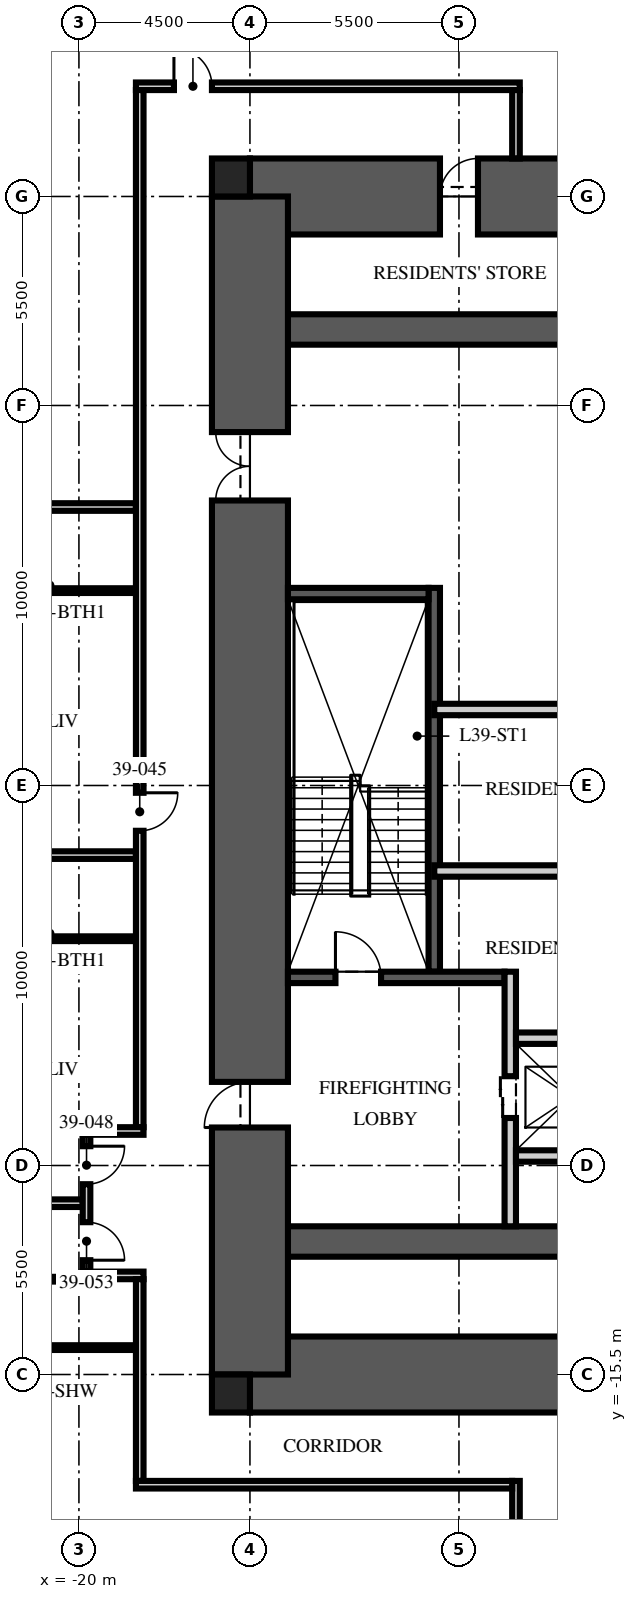
"""IFC4 building model, lengths in metres.
Left out: names, types, materials, properties, quantities, classifications, styles, units other than length and angle.
Written with IfcOpenShell. Run it as: python <this file> out.ifc"""

import sys

from ifc_helpers import new_model, si_unit, direction, frame, frame_2d, origin, origin_2d, place, context, subcontext, project, spatial, rectangle, extrude, element, fill, save


model = new_model("IFC4")
c1 = context("Model", 3, precision=1e-05, world=origin(), true_north=direction((0.0, 1.0)))
c2 = subcontext(c1, "Body", "Model", "MODEL_VIEW")
j1 = project(units=[si_unit("LENGTHUNIT", "METRE"), si_unit("PLANEANGLEUNIT", "RADIAN")], contexts=[c1])
p1 = place(None, origin())
s1 = spatial("IfcSite", under=j1, at=p1, CompositionType="ELEMENT")
p2 = place(p1, origin())
s2 = spatial("IfcBuilding", under=s1, at=p2, CompositionType="ELEMENT")
p3 = place(p2, frame((0.0, 0.0, 156.0)))
s3 = spatial("IfcBuildingStorey", under=s2, at=p3, CompositionType="ELEMENT", Elevation=156.0)
p4 = place(p3, frame((-15.5, 15.5, -0.25), z_axis=(0.0, 0.0, 1.0), x_axis=(1.0, 0.0, 0.0)))
e1 = element("IfcWall", 1, at=p4, inside=s3, PredefinedType="SHEAR", context=c2, shape_type="SweptSolid", body=[
    extrude(rectangle(XDim=31.0, YDim=2.0, at=frame_2d((15.5, 0.0))), origin(), (0.0, 0.0, 1.0), 3.75),
])
p5 = place(p4, frame((5.0, 0.0, 0.25)))
e2 = element("IfcOpeningElement", 2, at=p5, cuts=e1, PredefinedType="OPENING", context=c2, shape_type="SweptSolid", body=[
    extrude(rectangle(XDim=1.0, YDim=2.1, at=frame_2d((0.5, 1.05))), frame((0.0, 1.01, 0.0), z_axis=(0.0, -1.0, 0.0), x_axis=(1.0, 0.0, 0.0)), (0.0, 0.0, 1.0), 2.02),
])
p6 = place(p3, frame((-15.5, -15.5, -0.25), z_axis=(0.0, 0.0, 1.0), x_axis=(1.0, 0.0, 0.0)))
e3 = element("IfcWall", 3, at=p6, inside=s3, PredefinedType="SHEAR", context=c2, shape_type="SweptSolid", body=[
    extrude(rectangle(XDim=31.0, YDim=2.0, at=frame_2d((15.5, 0.0))), origin(), (0.0, 0.0, 1.0), 3.75),
])
p7 = place(p6, frame((10.4, 0.0, 0.25)))
e4 = element("IfcOpeningElement", 4, at=p7, cuts=e3, PredefinedType="OPENING", context=c2, shape_type="SweptSolid", body=[
    extrude(rectangle(XDim=1.1, YDim=2.1, at=frame_2d((0.55, 1.05))), frame((0.0, 1.01, 0.0), z_axis=(0.0, -1.0, 0.0), x_axis=(1.0, 0.0, 0.0)), (0.0, 0.0, 1.0), 2.02),
])
p8 = place(p6, frame((13.5, 0.0, 0.25)))
e5 = element("IfcOpeningElement", 5, at=p8, cuts=e3, PredefinedType="OPENING", context=c2, shape_type="SweptSolid", body=[
    extrude(rectangle(XDim=1.1, YDim=2.1, at=frame_2d((0.55, 1.05))), frame((0.0, 1.01, 0.0), z_axis=(0.0, -1.0, 0.0), x_axis=(1.0, 0.0, 0.0)), (0.0, 0.0, 1.0), 2.02),
])
p9 = place(p6, frame((16.6, 0.0, 0.25)))
e6 = element("IfcOpeningElement", 6, at=p9, cuts=e3, PredefinedType="OPENING", context=c2, shape_type="SweptSolid", body=[
    extrude(rectangle(XDim=1.1, YDim=2.1, at=frame_2d((0.55, 1.05))), frame((0.0, 1.01, 0.0), z_axis=(0.0, -1.0, 0.0), x_axis=(1.0, 0.0, 0.0)), (0.0, 0.0, 1.0), 2.02),
])
for number, where, z_axis, x_axis in (
    (7, (-15.5, 12.0, -0.25), (0.0, 0.0, 1.0), (1.0, 0.0, 0.0)),
    (8, (-15.5, -12.0, -0.25), (0.0, 0.0, 1.0), (1.0, 0.0, 0.0)),
):
    element("IfcWall", number, at=place(p3, frame(where, z_axis=z_axis, x_axis=x_axis)), inside=s3, PredefinedType="SHEAR", context=c2, shape_type="SweptSolid", body=[
        extrude(rectangle(XDim=31.0, YDim=0.8, at=frame_2d((15.5, 0.0))), origin(), (0.0, 0.0, 1.0), 3.75),
    ])
p10 = place(p3, frame((-15.5, -15.5, -0.25), z_axis=(0.0, 0.0, 1.0), x_axis=(0.0, 1.0, 0.0)))
e9 = element("IfcWall", 9, at=p10, inside=s3, PredefinedType="SHEAR", context=c2, shape_type="SweptSolid", body=[
    extrude(rectangle(XDim=31.0, YDim=2.0, at=frame_2d((15.5, 0.0))), origin(), (0.0, 0.0, 1.0), 3.75),
])
p11 = place(p10, frame((6.5, 0.0, 0.25)))
e10 = element("IfcOpeningElement", 10, at=p11, cuts=e9, PredefinedType="OPENING", context=c2, shape_type="SweptSolid", body=[
    extrude(rectangle(XDim=1.2, YDim=2.1, at=frame_2d((0.6, 1.05))), frame((0.0, 1.01, 0.0), z_axis=(0.0, -1.0, 0.0), x_axis=(1.0, 0.0, 0.0)), (0.0, 0.0, 1.0), 2.02),
])
p12 = place(p10, frame((23.0, 0.0, 0.25)))
e11 = element("IfcOpeningElement", 11, at=p12, cuts=e9, PredefinedType="OPENING", context=c2, shape_type="SweptSolid", body=[
    extrude(rectangle(XDim=1.8, YDim=2.1, at=frame_2d((0.9, 1.05))), frame((0.0, 1.01, 0.0), z_axis=(0.0, -1.0, 0.0), x_axis=(1.0, 0.0, 0.0)), (0.0, 0.0, 1.0), 2.02),
])
for number, where, z_axis, x_axis in (
    (12, (-16.0, 16.0, -0.25), (0.0, 0.0, 1.0), (1.0, 0.0, 0.0)),
    (13, (-16.0, -16.0, -0.25), (0.0, 0.0, 1.0), (1.0, 0.0, 0.0)),
):
    element("IfcColumn", number, at=place(p3, frame(where, z_axis=z_axis, x_axis=x_axis)), inside=s3, PredefinedType="COLUMN", context=c2, shape_type="SweptSolid", body=[
        extrude(rectangle(XDim=1.0, YDim=1.0, at=origin_2d()), origin(), (0.0, 0.0, 1.0), 3.75),
    ])
p13 = place(p3, frame((-10.65, -4.9, 0.0), z_axis=(0.0, 0.0, 1.0), x_axis=(0.0, 1.0, 0.0)))
e14 = element("IfcWall", 14, at=p13, inside=s3, PredefinedType="SOLIDWALL", context=c2, shape_type="SweptSolid", body=[
    extrude(rectangle(XDim=10.1, YDim=0.3, at=frame_2d((5.05, 0.0))), origin(), (0.0, 0.0, 1.0), 3.5),
])
p14 = place(p3, frame((-14.5, -5.05, 0.0), z_axis=(0.0, 0.0, 1.0), x_axis=(1.0, 0.0, 0.0)))
e15 = element("IfcWall", 15, at=p14, inside=s3, PredefinedType="SOLIDWALL", context=c2, shape_type="SweptSolid", body=[
    extrude(rectangle(XDim=5.7, YDim=0.3, at=frame_2d((2.85, 0.0))), origin(), (0.0, 0.0, 1.0), 3.5),
])
p15 = place(p14, frame((1.25, 0.0, 0.0)))
e16 = element("IfcOpeningElement", 16, at=p15, cuts=e15, PredefinedType="OPENING", context=c2, shape_type="SweptSolid", body=[
    extrude(rectangle(XDim=1.2, YDim=2.1, at=frame_2d((0.6, 1.05))), frame((0.0, 0.16, 0.0), z_axis=(0.0, -1.0, 0.0), x_axis=(1.0, 0.0, 0.0)), (0.0, 0.0, 1.0), 0.32),
])
p16 = place(p3, frame((-14.5, 5.05, 0.0), z_axis=(0.0, 0.0, 1.0), x_axis=(1.0, 0.0, 0.0)))
e17 = element("IfcWall", 17, at=p16, inside=s3, PredefinedType="SOLIDWALL", context=c2, shape_type="SweptSolid", body=[
    extrude(rectangle(XDim=3.7, YDim=0.3, at=frame_2d((1.85, 0.0))), origin(), (0.0, 0.0, 1.0), 3.5),
])
p17 = place(p3, frame((-8.65, -11.6, 0.0), z_axis=(0.0, 0.0, 1.0), x_axis=(0.0, 1.0, 0.0)))
e18 = element("IfcWall", 18, at=p17, inside=s3, PredefinedType="PARTITIONING", context=c2, shape_type="SweptSolid", body=[
    extrude(rectangle(XDim=6.7, YDim=0.3, at=frame_2d((3.35, 0.0))), origin(), (0.0, 0.0, 1.0), 3.5),
])
p18 = place(p17, frame((2.85, 0.0, 0.0)))
e19 = element("IfcOpeningElement", 19, at=p18, cuts=e18, PredefinedType="OPENING", context=c2, shape_type="SweptSolid", body=[
    extrude(rectangle(XDim=1.1, YDim=2.1, at=frame_2d((0.55, 1.05))), frame((0.0, 0.16, 0.0), z_axis=(0.0, -1.0, 0.0), x_axis=(1.0, 0.0, 0.0)), (0.0, 0.0, 1.0), 0.32),
])
p19 = place(p3, frame((-8.5, -6.65, 0.0), z_axis=(0.0, 0.0, 1.0), x_axis=(1.0, 0.0, 0.0)))
e20 = element("IfcWall", 20, at=p19, inside=s3, PredefinedType="PARTITIONING", context=c2, shape_type="SweptSolid", body=[
    extrude(rectangle(XDim=17.0, YDim=0.3, at=frame_2d((8.5, 0.0))), origin(), (0.0, 0.0, 1.0), 3.5),
])
p20 = place(p19, frame((7.8, 0.0, 0.0)))
e21 = element("IfcOpeningElement", 21, at=p20, cuts=e20, PredefinedType="OPENING", context=c2, shape_type="SweptSolid", body=[
    extrude(rectangle(XDim=1.3, YDim=2.4, at=frame_2d((0.65, 1.2))), frame((0.0, 0.16, 0.0), z_axis=(0.0, -1.0, 0.0), x_axis=(1.0, 0.0, 0.0)), (0.0, 0.0, 1.0), 0.32),
])
p21 = place(p19, frame((5.65, 0.0, 0.0)))
e22 = element("IfcOpeningElement", 22, at=p21, cuts=e20, PredefinedType="OPENING", context=c2, shape_type="SweptSolid", body=[
    extrude(rectangle(XDim=0.9, YDim=2.1, at=frame_2d((0.45, 1.05))), frame((0.0, 0.16, 0.0), z_axis=(0.0, -1.0, 0.0), x_axis=(1.0, 0.0, 0.0)), (0.0, 0.0, 1.0), 0.32),
])
p22 = place(p19, frame((10.4, 0.0, 0.0)))
e23 = element("IfcOpeningElement", 23, at=p22, cuts=e20, PredefinedType="OPENING", context=c2, shape_type="SweptSolid", body=[
    extrude(rectangle(XDim=0.9, YDim=2.1, at=frame_2d((0.45, 1.05))), frame((0.0, 0.16, 0.0), z_axis=(0.0, -1.0, 0.0), x_axis=(1.0, 0.0, 0.0)), (0.0, 0.0, 1.0), 0.32),
])
p23 = place(p3, frame((-8.5, -9.75, 0.0), z_axis=(0.0, 0.0, 1.0), x_axis=(1.0, 0.0, 0.0)))
e24 = element("IfcWall", 24, at=p23, inside=s3, PredefinedType="PARTITIONING", context=c2, shape_type="SweptSolid", body=[
    extrude(rectangle(XDim=2.9, YDim=0.3, at=frame_2d((1.45, 0.0))), origin(), (0.0, 0.0, 1.0), 3.5),
])
p24 = place(p3, frame((-10.65, 2.0, 0.0), z_axis=(0.0, 0.0, 1.0), x_axis=(1.0, 0.0, 0.0)))
e25 = element("IfcWall", 25, at=p24, inside=s3, PredefinedType="PARTITIONING", context=c2, shape_type="SweptSolid", body=[
    extrude(rectangle(XDim=21.3, YDim=0.3, at=frame_2d((10.65, 0.0))), origin(), (0.0, 0.0, 1.0), 3.5),
])
p25 = place(p24, frame((10.05, 0.0, 0.0)))
e26 = element("IfcOpeningElement", 26, at=p25, cuts=e25, PredefinedType="OPENING", context=c2, shape_type="SweptSolid", body=[
    extrude(rectangle(XDim=1.2, YDim=2.1, at=frame_2d((0.6, 1.05))), frame((0.0, 0.16, 0.0), z_axis=(0.0, -1.0, 0.0), x_axis=(1.0, 0.0, 0.0)), (0.0, 0.0, 1.0), 0.32),
])
p26 = place(p24, frame((18.942, 0.0, 0.0)))
e27 = element("IfcOpeningElement", 27, at=p26, cuts=e25, PredefinedType="OPENING", context=c2, shape_type="SweptSolid", body=[
    extrude(rectangle(XDim=0.9, YDim=2.1, at=frame_2d((0.45, 1.05))), frame((0.0, 0.16, 0.0), z_axis=(0.0, -1.0, 0.0), x_axis=(1.0, 0.0, 0.0)), (0.0, 0.0, 1.0), 0.32),
])
p27 = place(p3, frame((-10.65, -2.25, 0.0), z_axis=(0.0, 0.0, 1.0), x_axis=(1.0, 0.0, 0.0)))
e28 = element("IfcWall", 28, at=p27, inside=s3, PredefinedType="PARTITIONING", context=c2, shape_type="SweptSolid", body=[
    extrude(rectangle(XDim=7.35, YDim=0.3, at=frame_2d((3.675, 0.0))), origin(), (0.0, 0.0, 1.0), 3.5),
])
p28 = place(p3, frame((-18.5, 18.4, 0.0), z_axis=(0.0, 0.0, 1.0), x_axis=(1.0, 0.0, 0.0)))
e29 = element("IfcWall", 29, at=p28, inside=s3, PredefinedType="PARTITIONING", context=c2, shape_type="SweptSolid", body=[
    extrude(rectangle(XDim=10.1, YDim=0.2, at=frame_2d((5.05, 0.0))), origin(), (0.0, 0.0, 1.0), 2.3),
])
p29 = place(p28, frame((1.0, 0.0, 0.0)))
e30 = element("IfcOpeningElement", 30, at=p29, cuts=e29, PredefinedType="OPENING", context=c2, shape_type="SweptSolid", body=[
    extrude(rectangle(XDim=1.0, YDim=2.2, at=frame_2d((0.5, 1.1))), frame((0.0, 0.11, 0.0), z_axis=(0.0, -1.0, 0.0), x_axis=(1.0, 0.0, 0.0)), (0.0, 0.0, 1.0), 0.22),
])
p30 = place(p3, frame((-8.5, 18.3, 0.0), z_axis=(0.0, 0.0, 1.0), x_axis=(0.0, -1.0, 0.0)))
e31 = element("IfcWall", 31, at=p30, inside=s3, PredefinedType="PARTITIONING", context=c2, shape_type="SweptSolid", body=[
    extrude(rectangle(XDim=1.8, YDim=0.2, at=frame_2d((0.9, 0.0))), origin(), (0.0, 0.0, 1.0), 3.5),
])
for number, where, z_axis, x_axis in (
    (32, (-18.5, 7.328, 0.0), (0.0, 0.0, 1.0), (-1.0, 0.0, 0.0)),
    (33, (-18.5, -1.832, 0.0), (0.0, 0.0, 1.0), (-1.0, 0.0, 0.0)),
):
    element("IfcWall", number, at=place(p3, frame(where, z_axis=z_axis, x_axis=x_axis)), inside=s3, PredefinedType="PARTITIONING", context=c2, shape_type="SweptSolid", body=[
        extrude(rectangle(XDim=9.9, YDim=0.2, at=frame_2d((4.95, 0.0))), origin(), (0.0, 0.0, 1.0), 2.81),
    ])
p31 = place(p3, frame((-19.9, -10.992, 0.0), z_axis=(0.0, 0.0, 1.0), x_axis=(-1.0, 0.0, 0.0)))
e34 = element("IfcWall", 34, at=p31, inside=s3, PredefinedType="PARTITIONING", context=c2, shape_type="SweptSolid", body=[
    extrude(rectangle(XDim=8.5, YDim=0.2, at=frame_2d((4.25, 0.0))), origin(), (0.0, 0.0, 1.0), 2.81),
])
for number, where, z_axis, x_axis in (
    (35, (-18.5, 5.128, 0.0), (0.0, 0.0, 1.0), (-1.0, 0.0, 0.0)),
    (36, (-18.5, -4.032, 0.0), (0.0, 0.0, 1.0), (-1.0, 0.0, 0.0)),
):
    element("IfcWall", number, at=place(p3, frame(where, z_axis=z_axis, x_axis=x_axis)), inside=s3, PredefinedType="PARTITIONING", context=c2, shape_type="SweptSolid", body=[
        extrude(rectangle(XDim=4.2, YDim=0.125, at=frame_2d((2.1, 0.0))), origin(), (0.0, 0.0, 1.0), 3.5),
    ])
p32 = place(p3, frame((-19.97, -12.992, 0.0), z_axis=(0.0, 0.0, 1.0), x_axis=(-1.0, 0.0, 0.0)))
e37 = element("IfcWall", 37, at=p32, inside=s3, PredefinedType="PARTITIONING", context=c2, shape_type="SweptSolid", body=[
    extrude(rectangle(XDim=2.73, YDim=0.125, at=frame_2d((1.365, 0.0))), origin(), (0.0, 0.0, 1.0), 3.5),
])
p33 = place(p3, frame((-18.5, -14.792, 0.0), z_axis=(0.0, 0.0, 1.0), x_axis=(-1.0, 0.0, 0.0)))
e38 = element("IfcWall", 38, at=p33, inside=s3, PredefinedType="PARTITIONING", context=c2, shape_type="SweptSolid", body=[
    extrude(rectangle(XDim=4.2, YDim=0.125, at=frame_2d((2.1, 0.0))), origin(), (0.0, 0.0, 1.0), 3.5),
])
p34 = place(p3, frame((-18.4, 18.3, 0.0), z_axis=(0.0, 0.0, 1.0), x_axis=(0.0, -1.0, 0.0)))
e39 = element("IfcWall", 39, at=p34, inside=s3, PredefinedType="PARTITIONING", context=c2, shape_type="SweptSolid", body=[
    extrude(rectangle(XDim=27.292, YDim=0.2, at=frame_2d((13.646, 0.0))), origin(), (0.0, 0.0, 1.0), 2.3),
])
p35 = place(p34, frame((18.492, 0.0, 0.0)))
e40 = element("IfcOpeningElement", 40, at=p35, cuts=e39, PredefinedType="OPENING", context=c2, shape_type="SweptSolid", body=[
    extrude(rectangle(XDim=1.0, YDim=2.2, at=frame_2d((0.5, 1.1))), frame((0.0, 0.11, 0.0), z_axis=(0.0, -1.0, 0.0), x_axis=(1.0, 0.0, 0.0)), (0.0, 0.0, 1.0), 0.22),
])
p36 = place(p3, frame((-18.3, -9.092, 0.0), z_axis=(0.0, 0.0, 1.0), x_axis=(-1.0, 0.0, 0.0)))
e41 = element("IfcWall", 41, at=p36, inside=s3, PredefinedType="PARTITIONING", context=c2, shape_type="SweptSolid", body=[
    extrude(rectangle(XDim=1.6, YDim=0.2, at=frame_2d((0.8, 0.0))), origin(), (0.0, 0.0, 1.0), 2.7),
])
p37 = place(p3, frame((-18.3, -12.892, 0.0), z_axis=(0.0, 0.0, 1.0), x_axis=(-1.0, 0.0, 0.0)))
e42 = element("IfcWall", 42, at=p37, inside=s3, PredefinedType="PARTITIONING", context=c2, shape_type="SweptSolid", body=[
    extrude(rectangle(XDim=1.6, YDim=0.2, at=frame_2d((0.8, 0.0))), origin(), (0.0, 0.0, 1.0), 3.5),
])
p38 = place(p3, frame((-19.8, -9.192, 0.0), z_axis=(0.0, 0.0, 1.0), x_axis=(0.0, -1.0, 0.0)))
e43 = element("IfcWall", 43, at=p38, inside=s3, PredefinedType="PARTITIONING", context=c2, shape_type="SweptSolid", body=[
    extrude(rectangle(XDim=3.6, YDim=0.2, at=frame_2d((1.8, 0.0))), origin(), (0.0, 0.0, 1.0), 2.7),
])
p39 = place(p38, frame((0.3, 0.0, 0.0)))
e44 = element("IfcOpeningElement", 44, at=p39, cuts=e43, PredefinedType="OPENING", context=c2, shape_type="SweptSolid", body=[
    extrude(rectangle(XDim=1.0, YDim=2.2, at=frame_2d((0.5, 1.1))), frame((0.0, 0.11, 0.0), z_axis=(0.0, -1.0, 0.0), x_axis=(1.0, 0.0, 0.0)), (0.0, 0.0, 1.0), 0.22),
])
p40 = place(p38, frame((2.3, 0.0, 0.0)))
e45 = element("IfcOpeningElement", 45, at=p40, cuts=e43, PredefinedType="OPENING", context=c2, shape_type="SweptSolid", body=[
    extrude(rectangle(XDim=1.0, YDim=2.2, at=frame_2d((0.5, 1.1))), frame((0.0, 0.11, 0.0), z_axis=(0.0, -1.0, 0.0), x_axis=(1.0, 0.0, 0.0)), (0.0, 0.0, 1.0), 0.22),
])
p41 = place(p3, frame((-18.4, -12.992, 0.0), z_axis=(0.0, 0.0, 1.0), x_axis=(0.0, -1.0, 0.0)))
e46 = element("IfcWall", 46, at=p41, inside=s3, PredefinedType="PARTITIONING", context=c2, shape_type="SweptSolid", body=[
    extrude(rectangle(XDim=5.308, YDim=0.2, at=frame_2d((2.654, 0.0))), origin(), (0.0, 0.0, 1.0), 2.3),
])
p42 = place(p3, frame((-8.5, -18.3, 0.0), z_axis=(0.0, 0.0, 1.0), x_axis=(0.0, -1.0, 0.0)))
e47 = element("IfcWall", 47, at=p42, inside=s3, PredefinedType="PARTITIONING", context=c2, shape_type="SweptSolid", body=[
    extrude(rectangle(XDim=3.0, YDim=0.2, at=frame_2d((1.5, 0.0))), origin(), (0.0, 0.0, 1.0), 3.5),
])
p43 = place(p3, frame((-8.6, -18.4, 0.0), z_axis=(0.0, 0.0, 1.0), x_axis=(-1.0, 0.0, 0.0)))
e48 = element("IfcWall", 48, at=p43, inside=s3, PredefinedType="PARTITIONING", context=c2, shape_type="SweptSolid", body=[
    extrude(rectangle(XDim=9.9, YDim=0.2, at=frame_2d((4.95, 0.0))), origin(), (0.0, 0.0, 1.0), 2.3),
])
p44 = place(p15, origin())
e49 = element("IfcDoor", 49, at=p44, inside=s3, OperationType="SINGLE_SWING_LEFT", PredefinedType="DOOR", context=c2, shape_type="SweptSolid", body=[
    extrude(rectangle(XDim=1.2, YDim=2.1, at=frame_2d((0.6, 1.05))), frame((0.0, 0.025, 0.0), z_axis=(0.0, -1.0, 0.0), x_axis=(1.0, 0.0, 0.0)), (0.0, 0.0, 1.0), 0.05),
])
fill(e16, e49)
p45 = place(p11, origin())
e50 = element("IfcDoor", 50, at=p45, inside=s3, OperationType="SINGLE_SWING_LEFT", PredefinedType="DOOR", context=c2, shape_type="SweptSolid", body=[
    extrude(rectangle(XDim=1.2, YDim=2.1, at=frame_2d((0.6, 1.05))), frame((0.0, 0.025, 0.0), z_axis=(0.0, -1.0, 0.0), x_axis=(1.0, 0.0, 0.0)), (0.0, 0.0, 1.0), 0.05),
])
fill(e10, e50)
p46 = place(p12, origin())
e51 = element("IfcDoor", 51, at=p46, inside=s3, OperationType="DOUBLE_DOOR_SINGLE_SWING", PredefinedType="DOOR", context=c2, shape_type="SweptSolid", body=[
    extrude(rectangle(XDim=1.8, YDim=2.1, at=frame_2d((0.9, 1.05))), frame((0.0, 0.025, 0.0), z_axis=(0.0, -1.0, 0.0), x_axis=(1.0, 0.0, 0.0)), (0.0, 0.0, 1.0), 0.05),
])
fill(e11, e51)
p47 = place(p18, origin())
e52 = element("IfcDoor", 52, at=p47, inside=s3, OperationType="DOUBLE_DOOR_SLIDING", PredefinedType="DOOR", context=c2, shape_type="SweptSolid", body=[
    extrude(rectangle(XDim=1.1, YDim=2.1, at=frame_2d((0.55, 1.05))), frame((0.0, 0.025, 0.0), z_axis=(0.0, -1.0, 0.0), x_axis=(1.0, 0.0, 0.0)), (0.0, 0.0, 1.0), 0.05),
])
fill(e19, e52)
p48 = place(p5, origin())
e53 = element("IfcDoor", 53, at=p48, inside=s3, OperationType="SINGLE_SWING_RIGHT", PredefinedType="DOOR", context=c2, shape_type="SweptSolid", body=[
    extrude(rectangle(XDim=1.0, YDim=2.1, at=frame_2d((0.5, 1.05))), frame((0.0, 0.025, 0.0), z_axis=(0.0, -1.0, 0.0), x_axis=(1.0, 0.0, 0.0)), (0.0, 0.0, 1.0), 0.05),
])
fill(e2, e53)
p49 = place(p29, origin())
e54 = element("IfcDoor", 54, at=p49, inside=s3, OperationType="SINGLE_SWING_LEFT", PredefinedType="DOOR", context=c2, shape_type="SweptSolid", body=[
    extrude(rectangle(XDim=1.0, YDim=2.2, at=frame_2d((0.5, 1.1))), frame((0.0, 0.025, 0.0), z_axis=(0.0, -1.0, 0.0), x_axis=(1.0, 0.0, 0.0)), (0.0, 0.0, 1.0), 0.05),
])
fill(e30, e54)
p50 = place(p35, origin())
e55 = element("IfcDoor", 55, at=p50, inside=s3, OperationType="SINGLE_SWING_LEFT", PredefinedType="DOOR", context=c2, shape_type="SweptSolid", body=[
    extrude(rectangle(XDim=1.0, YDim=2.2, at=frame_2d((0.5, 1.1))), frame((0.0, 0.025, 0.0), z_axis=(0.0, -1.0, 0.0), x_axis=(1.0, 0.0, 0.0)), (0.0, 0.0, 1.0), 0.05),
])
fill(e40, e55)
p51 = place(p39, origin())
e56 = element("IfcDoor", 56, at=p51, inside=s3, OperationType="SINGLE_SWING_LEFT", PredefinedType="DOOR", context=c2, shape_type="SweptSolid", body=[
    extrude(rectangle(XDim=1.0, YDim=2.2, at=frame_2d((0.5, 1.1))), frame((0.0, 0.025, 0.0), z_axis=(0.0, -1.0, 0.0), x_axis=(1.0, 0.0, 0.0)), (0.0, 0.0, 1.0), 0.05),
])
fill(e44, e56)
p52 = place(p40, origin())
e57 = element("IfcDoor", 57, at=p52, inside=s3, OperationType="SINGLE_SWING_RIGHT", PredefinedType="DOOR", context=c2, shape_type="SweptSolid", body=[
    extrude(rectangle(XDim=1.0, YDim=2.2, at=frame_2d((0.5, 1.1))), frame((0.0, 0.025, 0.0), z_axis=(0.0, -1.0, 0.0), x_axis=(1.0, 0.0, 0.0)), (0.0, 0.0, 1.0), 0.05),
])
fill(e45, e57)
save(model, sys.argv[1])
